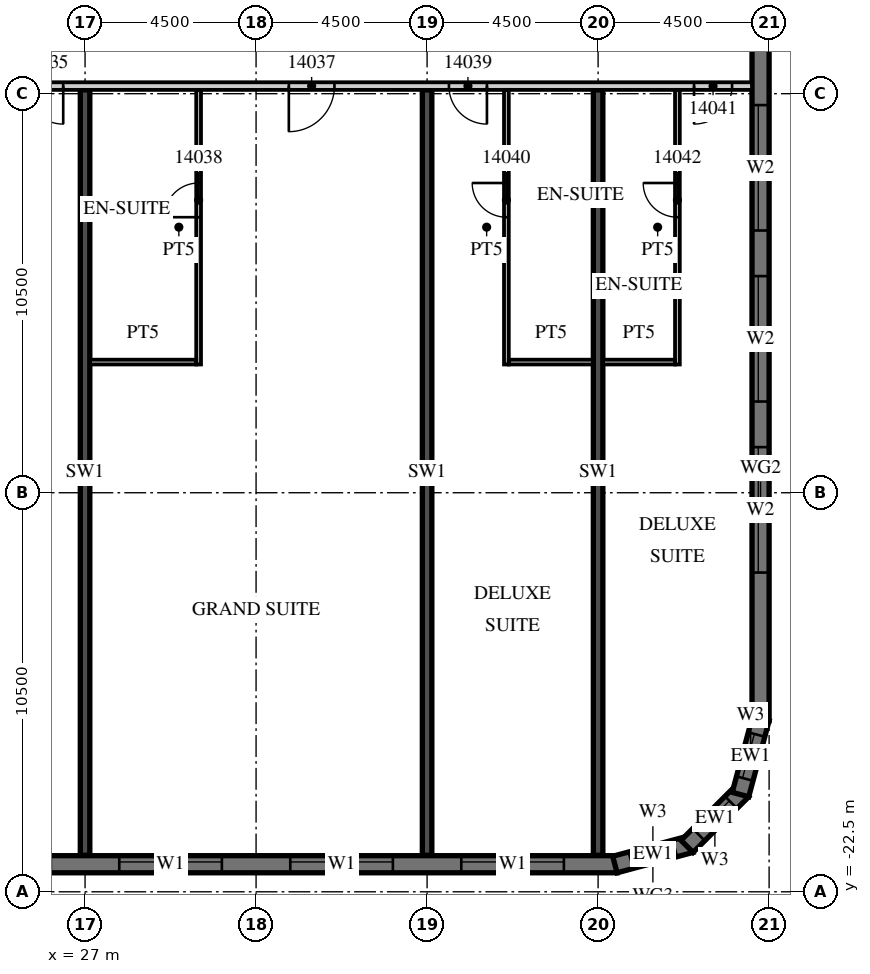
"""IFC4 building model, lengths in metres.
Left out: names, types, materials, properties, quantities, classifications, styles, units other than length and angle.
Written with IfcOpenShell. Run it as: python <this file> out.ifc"""

import sys

from ifc_helpers import new_model, si_unit, direction, frame, frame_2d, origin, place, context, subcontext, project, spatial, polyline, rectangle, outline, extrude, element, fill, save


model = new_model("IFC4")
c1 = context("Model", 3, precision=1e-05, world=origin(), true_north=direction((0.0, 1.0)))
c2 = subcontext(c1, "Body", "Model", "MODEL_VIEW")
j1 = project(units=[si_unit("LENGTHUNIT", "METRE"), si_unit("PLANEANGLEUNIT", "RADIAN")], contexts=[c1])
p1 = place(None, origin())
s1 = spatial("IfcSite", under=j1, at=p1, CompositionType="ELEMENT")
p2 = place(p1, origin())
s2 = spatial("IfcBuilding", under=s1, at=p2, CompositionType="ELEMENT")
p3 = place(p2, frame((0.0, 0.0, 76.5)))
s3 = spatial("IfcBuildingStorey", under=s2, at=p3, CompositionType="ELEMENT", Elevation=76.5)
for number, where, z_axis, x_axis in (
    (1, (27.0, -21.54, 0.0), (0.0, 0.0, 1.0), (0.0, 1.0, 0.0)),
    (2, (36.0, -21.54, 0.0), (0.0, 0.0, 1.0), (0.0, 1.0, 0.0)),
    (3, (40.5, -21.54, 0.0), (0.0, 0.0, 1.0), (0.0, 1.0, 0.0)),
):
    element("IfcWall", number, at=place(p3, frame(where, z_axis=z_axis, x_axis=x_axis)), inside=s3, PredefinedType="SHEAR", context=c2, shape_type="SweptSolid", body=[
        extrude(rectangle(XDim=20.14, YDim=0.25, at=frame_2d((10.07, 0.0))), origin(), (0.0, 0.0, 1.0), 3.3),
    ])
p4 = place(p3, frame((-13.5, -21.775, 0.0), z_axis=(0.0, 0.0, 1.0), x_axis=(1.0, 0.0, 0.0)))
e4 = element("IfcWall", 4, at=p4, inside=s3, PredefinedType="SOLIDWALL", context=c2, shape_type="SweptSolid", body=[
    extrude(rectangle(XDim=54.5, YDim=0.45, at=frame_2d((27.25, 0.0))), origin(), (0.0, 0.0, 1.0), 3.02),
])
p5 = place(p4, frame((0.9, 0.0, 0.45)))
e5 = element("IfcOpeningElement", 5, at=p5, cuts=e4, PredefinedType="OPENING", context=c2, shape_type="SweptSolid", body=[
    extrude(rectangle(XDim=2.7, YDim=2.25, at=frame_2d((1.35, 1.125))), frame((0.0, 0.235, 0.0), z_axis=(0.0, -1.0, 0.0), x_axis=(1.0, 0.0, 0.0)), (0.0, 0.0, 1.0), 0.47),
])
p6 = place(p4, frame((5.4, 0.0, 0.45)))
e6 = element("IfcOpeningElement", 6, at=p6, cuts=e4, PredefinedType="OPENING", context=c2, shape_type="SweptSolid", body=[
    extrude(rectangle(XDim=2.7, YDim=2.25, at=frame_2d((1.35, 1.125))), frame((0.0, 0.235, 0.0), z_axis=(0.0, -1.0, 0.0), x_axis=(1.0, 0.0, 0.0)), (0.0, 0.0, 1.0), 0.47),
])
p7 = place(p4, frame((9.9, 0.0, 0.45)))
e7 = element("IfcOpeningElement", 7, at=p7, cuts=e4, PredefinedType="OPENING", context=c2, shape_type="SweptSolid", body=[
    extrude(rectangle(XDim=2.7, YDim=2.25, at=frame_2d((1.35, 1.125))), frame((0.0, 0.235, 0.0), z_axis=(0.0, -1.0, 0.0), x_axis=(1.0, 0.0, 0.0)), (0.0, 0.0, 1.0), 0.47),
])
p8 = place(p4, frame((14.4, 0.0, 0.45)))
e8 = element("IfcOpeningElement", 8, at=p8, cuts=e4, PredefinedType="OPENING", context=c2, shape_type="SweptSolid", body=[
    extrude(rectangle(XDim=2.7, YDim=2.25, at=frame_2d((1.35, 1.125))), frame((0.0, 0.235, 0.0), z_axis=(0.0, -1.0, 0.0), x_axis=(1.0, 0.0, 0.0)), (0.0, 0.0, 1.0), 0.47),
])
p9 = place(p4, frame((18.9, 0.0, 0.45)))
e9 = element("IfcOpeningElement", 9, at=p9, cuts=e4, PredefinedType="OPENING", context=c2, shape_type="SweptSolid", body=[
    extrude(rectangle(XDim=2.7, YDim=2.25, at=frame_2d((1.35, 1.125))), frame((0.0, 0.235, 0.0), z_axis=(0.0, -1.0, 0.0), x_axis=(1.0, 0.0, 0.0)), (0.0, 0.0, 1.0), 0.47),
])
p10 = place(p4, frame((23.4, 0.0, 0.45)))
e10 = element("IfcOpeningElement", 10, at=p10, cuts=e4, PredefinedType="OPENING", context=c2, shape_type="SweptSolid", body=[
    extrude(rectangle(XDim=2.7, YDim=2.25, at=frame_2d((1.35, 1.125))), frame((0.0, 0.235, 0.0), z_axis=(0.0, -1.0, 0.0), x_axis=(1.0, 0.0, 0.0)), (0.0, 0.0, 1.0), 0.47),
])
p11 = place(p4, frame((27.9, 0.0, 0.45)))
e11 = element("IfcOpeningElement", 11, at=p11, cuts=e4, PredefinedType="OPENING", context=c2, shape_type="SweptSolid", body=[
    extrude(rectangle(XDim=2.7, YDim=2.25, at=frame_2d((1.35, 1.125))), frame((0.0, 0.235, 0.0), z_axis=(0.0, -1.0, 0.0), x_axis=(1.0, 0.0, 0.0)), (0.0, 0.0, 1.0), 0.47),
])
p12 = place(p4, frame((32.4, 0.0, 0.45)))
e12 = element("IfcOpeningElement", 12, at=p12, cuts=e4, PredefinedType="OPENING", context=c2, shape_type="SweptSolid", body=[
    extrude(rectangle(XDim=2.7, YDim=2.25, at=frame_2d((1.35, 1.125))), frame((0.0, 0.235, 0.0), z_axis=(0.0, -1.0, 0.0), x_axis=(1.0, 0.0, 0.0)), (0.0, 0.0, 1.0), 0.47),
])
p13 = place(p4, frame((36.9, 0.0, 0.45)))
e13 = element("IfcOpeningElement", 13, at=p13, cuts=e4, PredefinedType="OPENING", context=c2, shape_type="SweptSolid", body=[
    extrude(rectangle(XDim=2.7, YDim=2.25, at=frame_2d((1.35, 1.125))), frame((0.0, 0.235, 0.0), z_axis=(0.0, -1.0, 0.0), x_axis=(1.0, 0.0, 0.0)), (0.0, 0.0, 1.0), 0.47),
])
p14 = place(p4, frame((41.4, 0.0, 0.45)))
e14 = element("IfcOpeningElement", 14, at=p14, cuts=e4, PredefinedType="OPENING", context=c2, shape_type="SweptSolid", body=[
    extrude(rectangle(XDim=2.7, YDim=2.25, at=frame_2d((1.35, 1.125))), frame((0.0, 0.235, 0.0), z_axis=(0.0, -1.0, 0.0), x_axis=(1.0, 0.0, 0.0)), (0.0, 0.0, 1.0), 0.47),
])
p15 = place(p4, frame((45.9, 0.0, 0.45)))
e15 = element("IfcOpeningElement", 15, at=p15, cuts=e4, PredefinedType="OPENING", context=c2, shape_type="SweptSolid", body=[
    extrude(rectangle(XDim=2.7, YDim=2.25, at=frame_2d((1.35, 1.125))), frame((0.0, 0.235, 0.0), z_axis=(0.0, -1.0, 0.0), x_axis=(1.0, 0.0, 0.0)), (0.0, 0.0, 1.0), 0.47),
])
p16 = place(p4, frame((50.4, 0.0, 0.45)))
e16 = element("IfcOpeningElement", 16, at=p16, cuts=e4, PredefinedType="OPENING", context=c2, shape_type="SweptSolid", body=[
    extrude(rectangle(XDim=2.7, YDim=2.25, at=frame_2d((1.35, 1.125))), frame((0.0, 0.235, 0.0), z_axis=(0.0, -1.0, 0.0), x_axis=(1.0, 0.0, 0.0)), (0.0, 0.0, 1.0), 0.47),
])
p17 = place(p3, frame((40.942, -21.783, 0.0), z_axis=(0.0, 0.0, 1.0), x_axis=(0.965926999034, 0.25881466832, 0.0)))
e17 = element("IfcWall", 17, at=p17, inside=s3, PredefinedType="SOLIDWALL", context=c2, shape_type="SweptSolid", body=[
    extrude(outline(polyline([(0.0, -0.225), (2.071, -0.225), (1.95, 0.225), (0.121, 0.225), (0.0, -0.225)])), origin(), (0.0, 0.0, 1.0), 3.02),
])
p18 = place(p17, frame((0.435, 0.0, 0.45)))
e18 = element("IfcOpeningElement", 18, at=p18, cuts=e17, PredefinedType="OPENING", context=c2, shape_type="SweptSolid", body=[
    extrude(rectangle(XDim=1.2, YDim=2.25, at=frame_2d((0.6, 1.125))), frame((0.0, 0.235, 0.0), z_axis=(0.0, -1.0, 0.0), x_axis=(1.0, 0.0, 0.0)), (0.0, 0.0, 1.0), 0.47),
])
p19 = place(p3, frame((42.841, -21.305, 0.0), z_axis=(0.0, 0.0, 1.0), x_axis=(0.707106781187, 0.707106781187, 0.0)))
e19 = element("IfcWall", 19, at=p19, inside=s3, PredefinedType="SOLIDWALL", context=c2, shape_type="SweptSolid", body=[
    extrude(outline(polyline([(0.0, -0.225), (2.071, -0.225), (1.95, 0.225), (0.121, 0.225), (0.0, -0.225)])), origin(), (0.0, 0.0, 1.0), 3.02),
])
p20 = place(p19, frame((0.435, 0.0, 0.45)))
e20 = element("IfcOpeningElement", 20, at=p20, cuts=e19, PredefinedType="OPENING", context=c2, shape_type="SweptSolid", body=[
    extrude(rectangle(XDim=1.2, YDim=2.25, at=frame_2d((0.6, 1.125))), frame((0.0, 0.235, 0.0), z_axis=(0.0, -1.0, 0.0), x_axis=(1.0, 0.0, 0.0)), (0.0, 0.0, 1.0), 0.47),
])
p21 = place(p3, frame((44.247, -19.942, 0.0), z_axis=(0.0, 0.0, 1.0), x_axis=(0.25881466832, 0.965926999034, 0.0)))
e21 = element("IfcWall", 21, at=p21, inside=s3, PredefinedType="SOLIDWALL", context=c2, shape_type="SweptSolid", body=[
    extrude(outline(polyline([(-0.0, -0.225), (2.07, -0.225), (1.95, 0.225), (0.12, 0.225), (-0.0, -0.225)])), origin(), (0.0, 0.0, 1.0), 3.02),
])
p22 = place(p21, frame((0.435, 0.0, 0.45)))
e22 = element("IfcOpeningElement", 22, at=p22, cuts=e21, PredefinedType="OPENING", context=c2, shape_type="SweptSolid", body=[
    extrude(rectangle(XDim=1.2, YDim=2.25, at=frame_2d((0.6, 1.125))), frame((0.0, 0.235, 0.0), z_axis=(0.0, -1.0, 0.0), x_axis=(1.0, 0.0, 0.0)), (0.0, 0.0, 1.0), 0.47),
])
p23 = place(p3, frame((44.775, -18.0, 0.0), z_axis=(0.0, 0.0, 1.0), x_axis=(0.0, 1.0, 0.0)))
e23 = element("IfcWall", 23, at=p23, inside=s3, PredefinedType="SOLIDWALL", context=c2, shape_type="SweptSolid", body=[
    extrude(rectangle(XDim=36.0, YDim=0.45, at=frame_2d((18.0, 0.0))), origin(), (0.0, 0.0, 1.0), 3.02),
])
p24 = place(p23, frame((3.9, 0.0, 0.45)))
e24 = element("IfcOpeningElement", 24, at=p24, cuts=e23, PredefinedType="OPENING", context=c2, shape_type="SweptSolid", body=[
    extrude(rectangle(XDim=3.3, YDim=2.25, at=frame_2d((1.65, 1.125))), frame((0.0, 0.235, 0.0), z_axis=(0.0, -1.0, 0.0), x_axis=(1.0, 0.0, 0.0)), (0.0, 0.0, 1.0), 0.47),
])
p25 = place(p23, frame((8.4, 0.0, 0.45)))
e25 = element("IfcOpeningElement", 25, at=p25, cuts=e23, PredefinedType="OPENING", context=c2, shape_type="SweptSolid", body=[
    extrude(rectangle(XDim=3.3, YDim=2.25, at=frame_2d((1.65, 1.125))), frame((0.0, 0.235, 0.0), z_axis=(0.0, -1.0, 0.0), x_axis=(1.0, 0.0, 0.0)), (0.0, 0.0, 1.0), 0.47),
])
p26 = place(p23, frame((12.9, 0.0, 0.45)))
e26 = element("IfcOpeningElement", 26, at=p26, cuts=e23, PredefinedType="OPENING", context=c2, shape_type="SweptSolid", body=[
    extrude(rectangle(XDim=3.3, YDim=2.25, at=frame_2d((1.65, 1.125))), frame((0.0, 0.235, 0.0), z_axis=(0.0, -1.0, 0.0), x_axis=(1.0, 0.0, 0.0)), (0.0, 0.0, 1.0), 0.47),
])
p27 = place(p3, frame((-13.5, -1.3, 0.0), z_axis=(0.0, 0.0, 1.0), x_axis=(1.0, 0.0, 0.0)))
e27 = element("IfcWall", 27, at=p27, inside=s3, PredefinedType="PARTITIONING", context=c2, shape_type="SweptSolid", body=[
    extrude(rectangle(XDim=58.05, YDim=0.2, at=frame_2d((29.025, 0.0))), origin(), (0.0, 0.0, 1.0), 3.02),
])
p28 = place(p27, frame((2.925, 0.0, 0.0)))
e28 = element("IfcOpeningElement", 28, at=p28, cuts=e27, PredefinedType="OPENING", context=c2, shape_type="SweptSolid", body=[
    extrude(rectangle(XDim=1.0, YDim=2.1, at=frame_2d((0.5, 1.05))), frame((0.0, 0.11, 0.0), z_axis=(0.0, -1.0, 0.0), x_axis=(1.0, 0.0, 0.0)), (0.0, 0.0, 1.0), 0.22),
])
p29 = place(p27, frame((5.075, 0.0, 0.0)))
e29 = element("IfcOpeningElement", 29, at=p29, cuts=e27, PredefinedType="OPENING", context=c2, shape_type="SweptSolid", body=[
    extrude(rectangle(XDim=1.0, YDim=2.1, at=frame_2d((0.5, 1.05))), frame((0.0, 0.11, 0.0), z_axis=(0.0, -1.0, 0.0), x_axis=(1.0, 0.0, 0.0)), (0.0, 0.0, 1.0), 0.22),
])
p30 = place(p27, frame((9.55, 0.0, 0.0)))
e30 = element("IfcOpeningElement", 30, at=p30, cuts=e27, PredefinedType="OPENING", context=c2, shape_type="SweptSolid", body=[
    extrude(rectangle(XDim=1.0, YDim=2.1, at=frame_2d((0.5, 1.05))), frame((0.0, 0.11, 0.0), z_axis=(0.0, -1.0, 0.0), x_axis=(1.0, 0.0, 0.0)), (0.0, 0.0, 1.0), 0.22),
])
p31 = place(p27, frame((18.862, 0.0, 0.0)))
e31 = element("IfcOpeningElement", 31, at=p31, cuts=e27, PredefinedType="OPENING", context=c2, shape_type="SweptSolid", body=[
    extrude(rectangle(XDim=1.2, YDim=2.1, at=frame_2d((0.6, 1.05))), frame((0.0, 0.11, 0.0), z_axis=(0.0, -1.0, 0.0), x_axis=(1.0, 0.0, 0.0)), (0.0, 0.0, 1.0), 0.22),
])
p32 = place(p27, frame((27.862, 0.0, 0.0)))
e32 = element("IfcOpeningElement", 32, at=p32, cuts=e27, PredefinedType="OPENING", context=c2, shape_type="SweptSolid", body=[
    extrude(rectangle(XDim=1.2, YDim=2.1, at=frame_2d((0.6, 1.05))), frame((0.0, 0.11, 0.0), z_axis=(0.0, -1.0, 0.0), x_axis=(1.0, 0.0, 0.0)), (0.0, 0.0, 1.0), 0.22),
])
p33 = place(p27, frame((34.45, 0.0, 0.0)))
e33 = element("IfcOpeningElement", 33, at=p33, cuts=e27, PredefinedType="OPENING", context=c2, shape_type="SweptSolid", body=[
    extrude(rectangle(XDim=1.0, YDim=2.1, at=frame_2d((0.5, 1.05))), frame((0.0, 0.11, 0.0), z_axis=(0.0, -1.0, 0.0), x_axis=(1.0, 0.0, 0.0)), (0.0, 0.0, 1.0), 0.22),
])
p34 = place(p27, frame((38.925, 0.0, 0.0)))
e34 = element("IfcOpeningElement", 34, at=p34, cuts=e27, PredefinedType="OPENING", context=c2, shape_type="SweptSolid", body=[
    extrude(rectangle(XDim=1.0, YDim=2.1, at=frame_2d((0.5, 1.05))), frame((0.0, 0.11, 0.0), z_axis=(0.0, -1.0, 0.0), x_axis=(1.0, 0.0, 0.0)), (0.0, 0.0, 1.0), 0.22),
])
p35 = place(p27, frame((45.862, 0.0, 0.0)))
e35 = element("IfcOpeningElement", 35, at=p35, cuts=e27, PredefinedType="OPENING", context=c2, shape_type="SweptSolid", body=[
    extrude(rectangle(XDim=1.2, YDim=2.1, at=frame_2d((0.6, 1.05))), frame((0.0, 0.11, 0.0), z_axis=(0.0, -1.0, 0.0), x_axis=(1.0, 0.0, 0.0)), (0.0, 0.0, 1.0), 0.22),
])
p36 = place(p27, frame((50.075, 0.0, 0.0)))
e36 = element("IfcOpeningElement", 36, at=p36, cuts=e27, PredefinedType="OPENING", context=c2, shape_type="SweptSolid", body=[
    extrude(rectangle(XDim=1.0, YDim=2.1, at=frame_2d((0.5, 1.05))), frame((0.0, 0.11, 0.0), z_axis=(0.0, -1.0, 0.0), x_axis=(1.0, 0.0, 0.0)), (0.0, 0.0, 1.0), 0.22),
])
p37 = place(p27, frame((56.525, 0.0, 0.0)))
e37 = element("IfcOpeningElement", 37, at=p37, cuts=e27, PredefinedType="OPENING", context=c2, shape_type="SweptSolid", body=[
    extrude(rectangle(XDim=1.0, YDim=2.1, at=frame_2d((0.5, 1.05))), frame((0.0, 0.11, 0.0), z_axis=(0.0, -1.0, 0.0), x_axis=(1.0, 0.0, 0.0)), (0.0, 0.0, 1.0), 0.22),
])
p38 = place(p3, frame((29.988, -8.625, 0.0), z_axis=(0.0, 0.0, 1.0), x_axis=(0.0, 1.0, 0.0)))
e38 = element("IfcWall", 38, at=p38, inside=s3, PredefinedType="PARTITIONING", context=c2, shape_type="SweptSolid", body=[
    extrude(rectangle(XDim=7.225, YDim=0.125, at=frame_2d((3.613, 0.0))), origin(), (0.0, 0.0, 1.0), 3.02),
])
p39 = place(p38, frame((3.875, 0.0, 0.0)))
e39 = element("IfcOpeningElement", 39, at=p39, cuts=e38, PredefinedType="OPENING", context=c2, shape_type="SweptSolid", body=[
    extrude(rectangle(XDim=0.9, YDim=2.1, at=frame_2d((0.45, 1.05))), frame((0.0, 0.073, 0.0), z_axis=(0.0, -1.0, 0.0), x_axis=(1.0, 0.0, 0.0)), (0.0, 0.0, 1.0), 0.145),
])
p40 = place(p3, frame((27.125, -8.562, 0.0), z_axis=(0.0, 0.0, 1.0), x_axis=(1.0, 0.0, 0.0)))
e40 = element("IfcWall", 40, at=p40, inside=s3, PredefinedType="PARTITIONING", context=c2, shape_type="SweptSolid", body=[
    extrude(rectangle(XDim=2.8, YDim=0.125, at=frame_2d((1.4, 0.0))), origin(), (0.0, 0.0, 1.0), 3.02),
])
p41 = place(p3, frame((38.087, -8.625, 0.0), z_axis=(0.0, 0.0, 1.0), x_axis=(0.0, 1.0, 0.0)))
e41 = element("IfcWall", 41, at=p41, inside=s3, PredefinedType="PARTITIONING", context=c2, shape_type="SweptSolid", body=[
    extrude(rectangle(XDim=7.225, YDim=0.125, at=frame_2d((3.613, 0.0))), origin(), (0.0, 0.0, 1.0), 3.02),
])
p42 = place(p41, frame((3.875, 0.0, 0.0)))
e42 = element("IfcOpeningElement", 42, at=p42, cuts=e41, PredefinedType="OPENING", context=c2, shape_type="SweptSolid", body=[
    extrude(rectangle(XDim=0.9, YDim=2.1, at=frame_2d((0.45, 1.05))), frame((0.0, 0.073, 0.0), z_axis=(0.0, -1.0, 0.0), x_axis=(1.0, 0.0, 0.0)), (0.0, 0.0, 1.0), 0.145),
])
p43 = place(p3, frame((38.15, -8.562, 0.0), z_axis=(0.0, 0.0, 1.0), x_axis=(1.0, 0.0, 0.0)))
e43 = element("IfcWall", 43, at=p43, inside=s3, PredefinedType="PARTITIONING", context=c2, shape_type="SweptSolid", body=[
    extrude(rectangle(XDim=2.225, YDim=0.125, at=frame_2d((1.113, 0.0))), origin(), (0.0, 0.0, 1.0), 3.02),
])
p44 = place(p3, frame((42.587, -8.625, 0.0), z_axis=(0.0, 0.0, 1.0), x_axis=(0.0, 1.0, 0.0)))
e44 = element("IfcWall", 44, at=p44, inside=s3, PredefinedType="PARTITIONING", context=c2, shape_type="SweptSolid", body=[
    extrude(rectangle(XDim=7.225, YDim=0.125, at=frame_2d((3.613, 0.0))), origin(), (0.0, 0.0, 1.0), 3.02),
])
p45 = place(p44, frame((3.875, 0.0, 0.0)))
e45 = element("IfcOpeningElement", 45, at=p45, cuts=e44, PredefinedType="OPENING", context=c2, shape_type="SweptSolid", body=[
    extrude(rectangle(XDim=0.9, YDim=2.1, at=frame_2d((0.45, 1.05))), frame((0.0, 0.073, 0.0), z_axis=(0.0, -1.0, 0.0), x_axis=(1.0, 0.0, 0.0)), (0.0, 0.0, 1.0), 0.145),
])
p46 = place(p3, frame((40.625, -8.562, 0.0), z_axis=(0.0, 0.0, 1.0), x_axis=(1.0, 0.0, 0.0)))
e46 = element("IfcWall", 46, at=p46, inside=s3, PredefinedType="PARTITIONING", context=c2, shape_type="SweptSolid", body=[
    extrude(rectangle(XDim=1.9, YDim=0.125, at=frame_2d((0.95, 0.0))), origin(), (0.0, 0.0, 1.0), 3.02),
])
p47 = place(p14, origin())
e47 = element("IfcWindow", 47, at=p47, inside=s3, PartitioningType="SINGLE_PANEL", PredefinedType="WINDOW", context=c2, shape_type="SweptSolid", body=[
    extrude(rectangle(XDim=2.7, YDim=2.25, at=frame_2d((1.35, 1.125))), frame((0.0, 0.09, 0.0), z_axis=(0.0, -1.0, 0.0), x_axis=(1.0, 0.0, 0.0)), (0.0, 0.0, 1.0), 0.06),
])
fill(e14, e47)
p48 = place(p15, origin())
e48 = element("IfcWindow", 48, at=p48, inside=s3, PartitioningType="SINGLE_PANEL", PredefinedType="WINDOW", context=c2, shape_type="SweptSolid", body=[
    extrude(rectangle(XDim=2.7, YDim=2.25, at=frame_2d((1.35, 1.125))), frame((0.0, 0.09, 0.0), z_axis=(0.0, -1.0, 0.0), x_axis=(1.0, 0.0, 0.0)), (0.0, 0.0, 1.0), 0.06),
])
fill(e15, e48)
p49 = place(p16, origin())
e49 = element("IfcWindow", 49, at=p49, inside=s3, PartitioningType="SINGLE_PANEL", PredefinedType="WINDOW", context=c2, shape_type="SweptSolid", body=[
    extrude(rectangle(XDim=2.7, YDim=2.25, at=frame_2d((1.35, 1.125))), frame((0.0, 0.09, 0.0), z_axis=(0.0, -1.0, 0.0), x_axis=(1.0, 0.0, 0.0)), (0.0, 0.0, 1.0), 0.06),
])
fill(e16, e49)
p50 = place(p18, origin())
e50 = element("IfcWindow", 50, at=p50, inside=s3, PartitioningType="SINGLE_PANEL", PredefinedType="WINDOW", context=c2, shape_type="SweptSolid", body=[
    extrude(rectangle(XDim=1.2, YDim=2.25, at=frame_2d((0.6, 1.125))), frame((0.0, 0.09, 0.0), z_axis=(0.0, -1.0, 0.0), x_axis=(1.0, 0.0, 0.0)), (0.0, 0.0, 1.0), 0.06),
])
fill(e18, e50)
p51 = place(p20, origin())
e51 = element("IfcWindow", 51, at=p51, inside=s3, PartitioningType="SINGLE_PANEL", PredefinedType="WINDOW", context=c2, shape_type="SweptSolid", body=[
    extrude(rectangle(XDim=1.2, YDim=2.25, at=frame_2d((0.6, 1.125))), frame((0.0, 0.09, 0.0), z_axis=(0.0, -1.0, 0.0), x_axis=(1.0, 0.0, 0.0)), (0.0, 0.0, 1.0), 0.06),
])
fill(e20, e51)
p52 = place(p22, origin())
e52 = element("IfcWindow", 52, at=p52, inside=s3, PartitioningType="SINGLE_PANEL", PredefinedType="WINDOW", context=c2, shape_type="SweptSolid", body=[
    extrude(rectangle(XDim=1.2, YDim=2.25, at=frame_2d((0.6, 1.125))), frame((0.0, 0.09, 0.0), z_axis=(0.0, -1.0, 0.0), x_axis=(1.0, 0.0, 0.0)), (0.0, 0.0, 1.0), 0.06),
])
fill(e22, e52)
p53 = place(p24, origin())
e53 = element("IfcWindow", 53, at=p53, inside=s3, PartitioningType="SINGLE_PANEL", PredefinedType="WINDOW", context=c2, shape_type="SweptSolid", body=[
    extrude(rectangle(XDim=3.3, YDim=2.25, at=frame_2d((1.65, 1.125))), frame((0.0, 0.09, 0.0), z_axis=(0.0, -1.0, 0.0), x_axis=(1.0, 0.0, 0.0)), (0.0, 0.0, 1.0), 0.06),
])
fill(e24, e53)
p54 = place(p25, origin())
e54 = element("IfcWindow", 54, at=p54, inside=s3, PartitioningType="SINGLE_PANEL", PredefinedType="WINDOW", context=c2, shape_type="SweptSolid", body=[
    extrude(rectangle(XDim=3.3, YDim=2.25, at=frame_2d((1.65, 1.125))), frame((0.0, 0.09, 0.0), z_axis=(0.0, -1.0, 0.0), x_axis=(1.0, 0.0, 0.0)), (0.0, 0.0, 1.0), 0.06),
])
fill(e25, e54)
p55 = place(p26, origin())
e55 = element("IfcWindow", 55, at=p55, inside=s3, PartitioningType="SINGLE_PANEL", PredefinedType="WINDOW", context=c2, shape_type="SweptSolid", body=[
    extrude(rectangle(XDim=3.3, YDim=2.25, at=frame_2d((1.65, 1.125))), frame((0.0, 0.09, 0.0), z_axis=(0.0, -1.0, 0.0), x_axis=(1.0, 0.0, 0.0)), (0.0, 0.0, 1.0), 0.06),
])
fill(e26, e55)
p56 = place(p34, origin())
e56 = element("IfcDoor", 56, at=p56, inside=s3, OperationType="SINGLE_SWING_RIGHT", PredefinedType="DOOR", context=c2, shape_type="SweptSolid", body=[
    extrude(rectangle(XDim=1.0, YDim=2.1, at=frame_2d((0.5, 1.05))), frame((0.0, 0.025, 0.0), z_axis=(0.0, -1.0, 0.0), x_axis=(1.0, 0.0, 0.0)), (0.0, 0.0, 1.0), 0.05),
])
fill(e34, e56)
p57 = place(p35, origin())
e57 = element("IfcDoor", 57, at=p57, inside=s3, OperationType="SINGLE_SWING_LEFT", PredefinedType="DOOR", context=c2, shape_type="SweptSolid", body=[
    extrude(rectangle(XDim=1.2, YDim=2.1, at=frame_2d((0.6, 1.05))), frame((0.0, 0.025, 0.0), z_axis=(0.0, -1.0, 0.0), x_axis=(1.0, 0.0, 0.0)), (0.0, 0.0, 1.0), 0.05),
])
fill(e35, e57)
p58 = place(p39, origin())
e58 = element("IfcDoor", 58, at=p58, inside=s3, OperationType="SINGLE_SWING_LEFT", PredefinedType="DOOR", context=c2, shape_type="SweptSolid", body=[
    extrude(rectangle(XDim=0.9, YDim=2.1, at=frame_2d((0.45, 1.05))), frame((0.0, 0.025, 0.0), z_axis=(0.0, -1.0, 0.0), x_axis=(1.0, 0.0, 0.0)), (0.0, 0.0, 1.0), 0.05),
])
fill(e39, e58)
p59 = place(p36, origin())
e59 = element("IfcDoor", 59, at=p59, inside=s3, OperationType="SINGLE_SWING_RIGHT", PredefinedType="DOOR", context=c2, shape_type="SweptSolid", body=[
    extrude(rectangle(XDim=1.0, YDim=2.1, at=frame_2d((0.5, 1.05))), frame((0.0, 0.025, 0.0), z_axis=(0.0, -1.0, 0.0), x_axis=(1.0, 0.0, 0.0)), (0.0, 0.0, 1.0), 0.05),
])
fill(e36, e59)
p60 = place(p42, origin())
e60 = element("IfcDoor", 60, at=p60, inside=s3, OperationType="SINGLE_SWING_RIGHT", PredefinedType="DOOR", context=c2, shape_type="SweptSolid", body=[
    extrude(rectangle(XDim=0.9, YDim=2.1, at=frame_2d((0.45, 1.05))), frame((0.0, 0.025, 0.0), z_axis=(0.0, -1.0, 0.0), x_axis=(1.0, 0.0, 0.0)), (0.0, 0.0, 1.0), 0.05),
])
fill(e42, e60)
p61 = place(p37, origin())
e61 = element("IfcDoor", 61, at=p61, inside=s3, OperationType="SINGLE_SWING_LEFT", PredefinedType="DOOR", context=c2, shape_type="SweptSolid", body=[
    extrude(rectangle(XDim=1.0, YDim=2.1, at=frame_2d((0.5, 1.05))), frame((0.0, 0.025, 0.0), z_axis=(0.0, -1.0, 0.0), x_axis=(1.0, 0.0, 0.0)), (0.0, 0.0, 1.0), 0.05),
])
fill(e37, e61)
p62 = place(p45, origin())
e62 = element("IfcDoor", 62, at=p62, inside=s3, OperationType="SINGLE_SWING_RIGHT", PredefinedType="DOOR", context=c2, shape_type="SweptSolid", body=[
    extrude(rectangle(XDim=0.9, YDim=2.1, at=frame_2d((0.45, 1.05))), frame((0.0, 0.025, 0.0), z_axis=(0.0, -1.0, 0.0), x_axis=(1.0, 0.0, 0.0)), (0.0, 0.0, 1.0), 0.05),
])
fill(e45, e62)
save(model, sys.argv[1])
